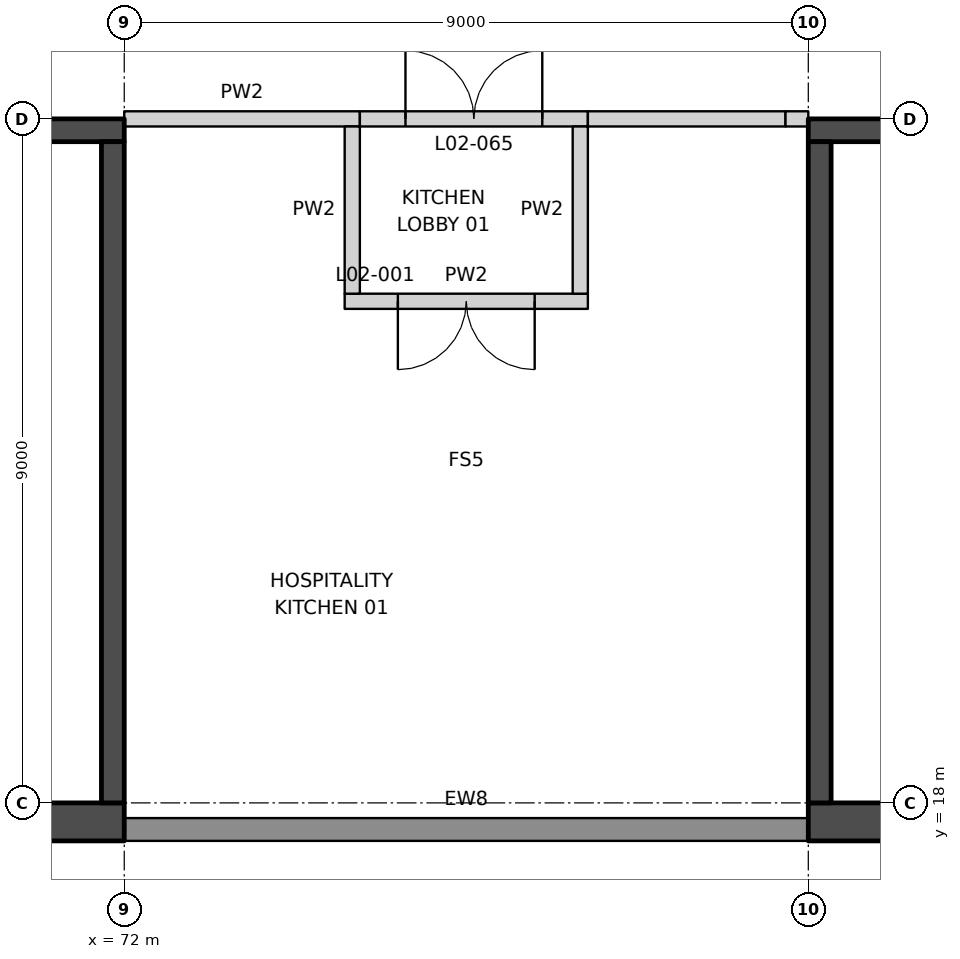
"""IFC4 building model, lengths in metres.
Left out: names, types, materials, properties, quantities, classifications, styles, units other than length and angle.
Written with IfcOpenShell. Run it as: python <this file> out.ifc"""

import sys

from ifc_helpers import new_model, si_unit, direction, frame, frame_2d, origin, place, context, subcontext, project, spatial, rectangle, extrude, element, fill, save


model = new_model("IFC4")
c1 = context("Model", 3, precision=1e-05, world=origin(), true_north=direction((0.0, 1.0)))
c2 = subcontext(c1, "Body", "Model", "MODEL_VIEW")
j1 = project(units=[si_unit("LENGTHUNIT", "METRE"), si_unit("PLANEANGLEUNIT", "RADIAN")], contexts=[c1])
p1 = place(None, origin())
s1 = spatial("IfcSite", under=j1, at=p1, CompositionType="ELEMENT")
p2 = place(p1, origin())
s2 = spatial("IfcBuilding", under=s1, at=p2, CompositionType="ELEMENT")
p3 = place(p2, frame((0.0, 0.0, 11.5)))
s3 = spatial("IfcBuildingStorey", under=s2, at=p3, CompositionType="ELEMENT", Elevation=11.5)
p4 = place(p3, frame((74.9, 24.6, 0.0), z_axis=(0.0, 0.0, 1.0), x_axis=(1.0, 0.0, 0.0)))
e1 = element("IfcWall", 1, at=p4, inside=s3, PredefinedType="PARTITIONING", context=c2, shape_type="SweptSolid", body=[
    extrude(rectangle(XDim=3.2, YDim=0.2, at=frame_2d((1.6, 0.0))), origin(), (0.0, 0.0, 1.0), 10.5),
])
p5 = place(p4, frame((0.7, 0.0, 0.0)))
e2 = element("IfcOpeningElement", 2, at=p5, cuts=e1, PredefinedType="OPENING", context=c2, shape_type="SweptSolid", body=[
    extrude(rectangle(XDim=1.8, YDim=2.1, at=frame_2d((0.9, 1.05))), frame((0.0, 0.11, 0.0), z_axis=(0.0, -1.0, 0.0), x_axis=(1.0, 0.0, 0.0)), (0.0, 0.0, 1.0), 0.22),
])
p6 = place(p3, frame((72.0, 27.0, 0.0), z_axis=(0.0, 0.0, 1.0), x_axis=(1.0, 0.0, 0.0)))
e3 = element("IfcWall", 3, at=p6, inside=s3, PredefinedType="PARTITIONING", context=c2, shape_type="SweptSolid", body=[
    extrude(rectangle(XDim=3.1, YDim=0.2, at=frame_2d((1.55, 0.0))), origin(), (0.0, 0.0, 1.0), 9.15),
])
p7 = place(p3, frame((75.1, 27.0, 0.0), z_axis=(0.0, 0.0, 1.0), x_axis=(1.0, 0.0, 0.0)))
e4 = element("IfcWall", 4, at=p7, inside=s3, PredefinedType="PARTITIONING", context=c2, shape_type="SweptSolid", body=[
    extrude(rectangle(XDim=3.0, YDim=0.2, at=frame_2d((1.5, 0.0))), origin(), (0.0, 0.0, 1.0), 9.15),
])
p8 = place(p7, frame((0.6, 0.0, 0.0)))
e5 = element("IfcOpeningElement", 5, at=p8, cuts=e4, PredefinedType="OPENING", context=c2, shape_type="SweptSolid", body=[
    extrude(rectangle(XDim=1.8, YDim=2.1, at=frame_2d((0.9, 1.05))), frame((0.0, 0.11, 0.0), z_axis=(0.0, -1.0, 0.0), x_axis=(1.0, 0.0, 0.0)), (0.0, 0.0, 1.0), 0.22),
])
p9 = place(p3, frame((78.1, 27.0, 0.0), z_axis=(0.0, 0.0, 1.0), x_axis=(1.0, 0.0, 0.0)))
e6 = element("IfcWall", 6, at=p9, inside=s3, PredefinedType="PARTITIONING", context=c2, shape_type="SweptSolid", body=[
    extrude(rectangle(XDim=2.6, YDim=0.2, at=frame_2d((1.3, 0.0))), origin(), (0.0, 0.0, 1.0), 9.15),
])
for number, where, z_axis, x_axis in (
    (7, (75.0, 24.7, 0.0), (0.0, 0.0, 1.0), (0.0, 1.0, 0.0)),
    (8, (78.0, 24.7, 0.0), (0.0, 0.0, 1.0), (0.0, 1.0, 0.0)),
):
    element("IfcWall", number, at=place(p3, frame(where, z_axis=z_axis, x_axis=x_axis)), inside=s3, PredefinedType="PARTITIONING", context=c2, shape_type="SweptSolid", body=[
        extrude(rectangle(XDim=2.2, YDim=0.2, at=frame_2d((1.1, 0.0))), origin(), (0.0, 0.0, 1.0), 10.5),
    ])
p10 = place(p3, frame((72.0, 17.65, 0.0), z_axis=(0.0, 0.0, 1.0), x_axis=(1.0, 0.0, 0.0)))
e9 = element("IfcWall", 9, at=p10, inside=s3, PredefinedType="SOLIDWALL", context=c2, shape_type="SweptSolid", body=[
    extrude(rectangle(XDim=9.0, YDim=0.3, at=frame_2d((4.5, 0.0))), origin(), (0.0, 0.0, 1.0), 10.5),
])
p11 = place(p3, frame((81.0, 26.85, 0.0), z_axis=(0.0, 0.0, 1.0), x_axis=(1.0, 0.0, 0.0)))
e10 = element("IfcWall", 10, at=p11, inside=s3, PredefinedType="SHEAR", context=c2, shape_type="SweptSolid", body=[
    extrude(rectangle(XDim=18.0, YDim=0.3, at=frame_2d((9.0, 0.0))), origin(), (0.0, 0.0, 1.0), 10.5),
])
p12 = place(p11, frame((8.6, 0.0, 0.0)))
e11 = element("IfcOpeningElement", 11, at=p12, cuts=e10, PredefinedType="OPENING", context=c2, shape_type="SweptSolid", body=[
    extrude(rectangle(XDim=1.2, YDim=2.1, at=frame_2d((0.6, 1.05))), frame((0.0, 0.16, 0.0), z_axis=(0.0, -1.0, 0.0), x_axis=(1.0, 0.0, 0.0)), (0.0, 0.0, 1.0), 0.32),
])
p13 = place(p3, frame((81.0, 17.75, 0.0), z_axis=(0.0, 0.0, 1.0), x_axis=(1.0, 0.0, 0.0)))
e12 = element("IfcWall", 12, at=p13, inside=s3, PredefinedType="SHEAR", context=c2, shape_type="SweptSolid", body=[
    extrude(rectangle(XDim=18.0, YDim=0.5, at=frame_2d((9.0, 0.0))), origin(), (0.0, 0.0, 1.0), 10.5),
])
p14 = place(p3, frame((81.15, 26.7, 0.0), z_axis=(0.0, 0.0, 1.0), x_axis=(0.0, -1.0, 0.0)))
e13 = element("IfcWall", 13, at=p14, inside=s3, PredefinedType="SHEAR", context=c2, shape_type="SweptSolid", body=[
    extrude(rectangle(XDim=8.7, YDim=0.3, at=frame_2d((4.35, 0.0))), origin(), (0.0, 0.0, 1.0), 10.5),
])
p15 = place(p3, frame((72.0, 26.85, 0.0), z_axis=(0.0, 0.0, 1.0), x_axis=(-1.0, 0.0, 0.0)))
e14 = element("IfcWall", 14, at=p15, inside=s3, PredefinedType="SHEAR", context=c2, shape_type="SweptSolid", body=[
    extrude(rectangle(XDim=18.0, YDim=0.3, at=frame_2d((9.0, 0.0))), origin(), (0.0, 0.0, 1.0), 10.5),
])
p16 = place(p15, frame((8.6, 0.0, 0.0)))
e15 = element("IfcOpeningElement", 15, at=p16, cuts=e14, PredefinedType="OPENING", context=c2, shape_type="SweptSolid", body=[
    extrude(rectangle(XDim=1.2, YDim=2.1, at=frame_2d((0.6, 1.05))), frame((0.0, 0.16, 0.0), z_axis=(0.0, -1.0, 0.0), x_axis=(1.0, 0.0, 0.0)), (0.0, 0.0, 1.0), 0.32),
])
p17 = place(p3, frame((72.0, 17.75, 0.0), z_axis=(0.0, 0.0, 1.0), x_axis=(-1.0, 0.0, 0.0)))
e16 = element("IfcWall", 16, at=p17, inside=s3, PredefinedType="SHEAR", context=c2, shape_type="SweptSolid", body=[
    extrude(rectangle(XDim=18.0, YDim=0.5, at=frame_2d((9.0, 0.0))), origin(), (0.0, 0.0, 1.0), 10.5),
])
p18 = place(p3, frame((71.85, 26.7, 0.0), z_axis=(0.0, 0.0, 1.0), x_axis=(0.0, -1.0, 0.0)))
e17 = element("IfcWall", 17, at=p18, inside=s3, PredefinedType="SHEAR", context=c2, shape_type="SweptSolid", body=[
    extrude(rectangle(XDim=8.7, YDim=0.3, at=frame_2d((4.35, 0.0))), origin(), (0.0, 0.0, 1.0), 10.5),
])
p19 = place(p3, frame((80.7, 27.0, 0.0), z_axis=(0.0, 0.0, 1.0), x_axis=(1.0, 0.0, 0.0)))
e18 = element("IfcWall", 18, at=p19, inside=s3, PredefinedType="PARTITIONING", context=c2, shape_type="SweptSolid", body=[
    extrude(rectangle(XDim=0.3, YDim=0.2, at=frame_2d((0.15, 0.0))), origin(), (0.0, 0.0, 1.0), 10.5),
])
p20 = place(p5, frame((1.8, 0.0, 0.0), z_axis=(0.0, 0.0, 1.0), x_axis=(-1.0, 0.0, 0.0)))
e19 = element("IfcDoor", 19, at=p20, inside=s3, OperationType="DOUBLE_DOOR_DOUBLE_SWING", PredefinedType="DOOR", context=c2, shape_type="SweptSolid", body=[
    extrude(rectangle(XDim=1.8, YDim=2.1, at=frame_2d((0.9, 1.05))), frame((0.0, 0.025, 0.0), z_axis=(0.0, -1.0, 0.0), x_axis=(1.0, 0.0, 0.0)), (0.0, 0.0, 1.0), 0.05),
])
fill(e2, e19)
p21 = place(p8, origin())
e20 = element("IfcDoor", 20, at=p21, inside=s3, OperationType="DOUBLE_DOOR_DOUBLE_SWING", PredefinedType="DOOR", context=c2, shape_type="SweptSolid", body=[
    extrude(rectangle(XDim=1.8, YDim=2.1, at=frame_2d((0.9, 1.05))), frame((0.0, 0.025, 0.0), z_axis=(0.0, -1.0, 0.0), x_axis=(1.0, 0.0, 0.0)), (0.0, 0.0, 1.0), 0.05),
])
fill(e5, e20)
save(model, sys.argv[1])
